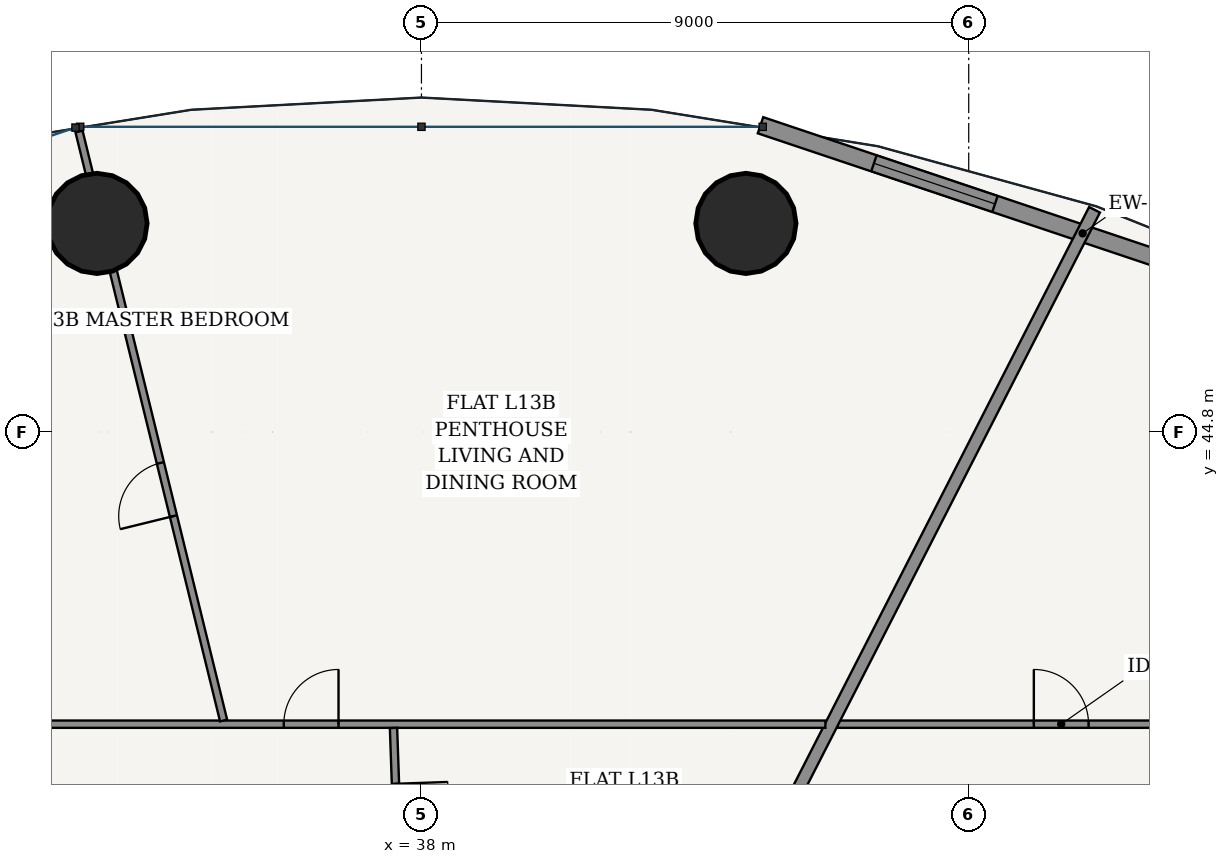
"""IFC4 building model, lengths in metres.
Left out: names, types, materials, properties, quantities, classifications, styles, units other than length and angle.
Written with IfcOpenShell. Run it as: python <this file> out.ifc"""

import sys

from ifc_helpers import new_model, si_unit, direction, frame, frame_2d, origin, origin_2d, place, context, subcontext, project, spatial, rectangle, hollow_circle, extrude, source, transform, mapped, element, fill, save


model = new_model("IFC4")
c1 = context("Model", 3, precision=1e-05, world=origin(), true_north=direction((-0.2419218956, 0.970295726276)))
c2 = subcontext(c1, "Body", "Model", "MODEL_VIEW")
j1 = project(units=[si_unit("LENGTHUNIT", "METRE"), si_unit("PLANEANGLEUNIT", "RADIAN")], contexts=[c1])
p1 = place(None, origin())
s1 = spatial("IfcSite", under=j1, at=p1, CompositionType="ELEMENT")
p2 = place(p1, origin())
s2 = spatial("IfcBuilding", under=s1, at=p2, CompositionType="ELEMENT")
p3 = place(p2, frame((0.0, 0.0, 52.8)))
s3 = spatial("IfcBuildingStorey", under=s2, at=p3, CompositionType="ELEMENT", Elevation=52.8)
for number, where, z_axis, x_axis in (
    (1, (43.336, 48.23, 0.0), (0.0, 0.0, 1.0), (1.0, 0.0, 0.0)),
    (2, (32.664, 48.23, 0.0), (0.0, 0.0, 1.0), (1.0, 0.0, 0.0)),
):
    element("IfcColumn", number, at=place(p3, frame(where, z_axis=z_axis, x_axis=x_axis)), inside=s3, PredefinedType="COLUMN", context=c2, shape_type="SweptSolid", body=[
        extrude(hollow_circle(Radius=0.825, WallThickness=0.05, at=origin_2d()), origin(), (0.0, 0.0, 1.0), 3.6),
    ])
p4 = place(p3, frame((54.171, 46.289, 0.0), z_axis=(0.0, 0.0, 1.0), x_axis=(-0.948041258496, 0.318147406385, 0.0)))
e3 = element("IfcWall", 3, at=p4, inside=s3, PredefinedType="SOLIDWALL", context=c2, shape_type="SweptSolid", body=[
    extrude(rectangle(XDim=11.175, YDim=0.28, at=frame_2d((5.588, 0.0))), origin(), (0.0, 0.0, 1.0), 3.32),
])
p5 = place(p4, frame((1.967, 0.0, 0.85)))
e4 = element("IfcOpeningElement", 4, at=p5, cuts=e3, PredefinedType="OPENING", context=c2, shape_type="SweptSolid", body=[
    extrude(rectangle(XDim=2.1, YDim=1.95, at=frame_2d((1.05, 0.975))), frame((0.0, 0.15, 0.0), z_axis=(0.0, -1.0, 0.0), x_axis=(1.0, 0.0, 0.0)), (0.0, 0.0, 1.0), 0.3),
])
p6 = place(p4, frame((7.108, 0.0, 0.85)))
e5 = element("IfcOpeningElement", 5, at=p6, cuts=e3, PredefinedType="OPENING", context=c2, shape_type="SweptSolid", body=[
    extrude(rectangle(XDim=2.1, YDim=1.95, at=frame_2d((1.05, 0.975))), frame((0.0, 0.15, 0.0), z_axis=(0.0, -1.0, 0.0), x_axis=(1.0, 0.0, 0.0)), (0.0, 0.0, 1.0), 0.3),
])
p7 = place(p3, frame((44.847, 39.995, 0.0), z_axis=(0.0, 0.0, 1.0), x_axis=(1.0, 0.0, 0.0)))
e6 = element("IfcWall", 6, at=p7, inside=s3, PredefinedType="PARTITIONING", context=c2, shape_type="SweptSolid", body=[
    extrude(rectangle(XDim=7.348, YDim=0.12, at=frame_2d((3.674, 0.0))), origin(), (0.0, 0.0, 1.0), 2.688),
])
p8 = place(p7, frame((3.224, 0.0, 0.0)))
e7 = element("IfcOpeningElement", 7, at=p8, cuts=e6, PredefinedType="OPENING", context=c2, shape_type="SweptSolid", body=[
    extrude(rectangle(XDim=0.9, YDim=2.15, at=frame_2d((0.45, 1.075))), frame((0.0, 0.07, 0.0), z_axis=(0.0, -1.0, 0.0), x_axis=(1.0, 0.0, 0.0)), (0.0, 0.0, 1.0), 0.14),
])
p9 = place(p3, frame((43.335, 37.237, 0.0), z_axis=(0.0, 0.0, 1.0), x_axis=(0.455148959499, 0.890415310216, 0.0)))
e8 = element("IfcWall", 8, at=p9, inside=s3, PredefinedType="PARTITIONING", context=c2, shape_type="SweptSolid", body=[
    extrude(rectangle(XDim=12.598, YDim=0.2, at=frame_2d((6.299, 0.0))), origin(), (0.0, 0.0, 1.0), 2.762),
])
p10 = place(p3, frame((23.805, 39.995, 0.0), z_axis=(0.0, 0.0, 1.0), x_axis=(1.0, 0.0, 0.0)))
e9 = element("IfcWall", 9, at=p10, inside=s3, PredefinedType="PARTITIONING", context=c2, shape_type="SweptSolid", body=[
    extrude(rectangle(XDim=20.838, YDim=0.12, at=frame_2d((10.419, 0.0))), origin(), (0.0, 0.0, 1.0), 2.688),
])
p11 = place(p10, frame((11.931, 0.0, 0.0)))
e10 = element("IfcOpeningElement", 10, at=p11, cuts=e9, PredefinedType="OPENING", context=c2, shape_type="SweptSolid", body=[
    extrude(rectangle(XDim=0.9, YDim=2.15, at=frame_2d((0.45, 1.075))), frame((0.0, 0.07, 0.0), z_axis=(0.0, -1.0, 0.0), x_axis=(1.0, 0.0, 0.0)), (0.0, 0.0, 1.0), 0.14),
])
p12 = place(p3, frame((34.746, 40.055, 0.0), z_axis=(0.0, 0.0, 1.0), x_axis=(-0.238386209483, 0.971170435675, 0.0)))
e11 = element("IfcWall", 11, at=p12, inside=s3, PredefinedType="PARTITIONING", context=c2, shape_type="SweptSolid", body=[
    extrude(rectangle(XDim=9.973, YDim=0.12, at=frame_2d((4.987, 0.0))), origin(), (0.0, 0.0, 1.0), 2.688),
])
p13 = place(p12, frame((3.461, 0.0, 0.0)))
e12 = element("IfcOpeningElement", 12, at=p13, cuts=e11, PredefinedType="OPENING", context=c2, shape_type="SweptSolid", body=[
    extrude(rectangle(XDim=0.9, YDim=2.15, at=frame_2d((0.45, 1.075))), frame((0.0, 0.07, 0.0), z_axis=(0.0, -1.0, 0.0), x_axis=(1.0, 0.0, 0.0)), (0.0, 0.0, 1.0), 0.14),
])
p14 = place(p3, frame((37.635, 37.237, 0.0), z_axis=(0.0, 0.0, 1.0), x_axis=(-0.03493293564, 0.999389658746, 0.0)))
e13 = element("IfcWall", 13, at=p14, inside=s3, PredefinedType="PARTITIONING", context=c2, shape_type="SweptSolid", body=[
    extrude(rectangle(XDim=2.698, YDim=0.12, at=frame_2d((1.349, 0.0))), origin(), (0.0, 0.0, 1.0), 3.32),
])
p15 = place(p14, frame((0.919, 0.0, 0.0)))
e14 = element("IfcOpeningElement", 14, at=p15, cuts=e13, PredefinedType="OPENING", context=c2, shape_type="SweptSolid", body=[
    extrude(rectangle(XDim=0.86, YDim=2.15, at=frame_2d((0.43, 1.075))), frame((0.0, 0.07, 0.0), z_axis=(0.0, -1.0, 0.0), x_axis=(1.0, 0.0, 0.0)), (0.0, 0.0, 1.0), 0.14),
])
m1 = source(origin(), c2, "Body", "SweptSolid", [
    extrude(rectangle(XDim=2.1, YDim=1.95, at=frame_2d((1.05, 0.975))), frame((0.0, 0.03, 0.0), z_axis=(0.0, -1.0, 0.0), x_axis=(1.0, 0.0, 0.0)), (0.0, 0.0, 1.0), 0.06),
])
p16 = place(p6, origin())
e15 = element("IfcWindow", 15, at=p16, inside=s3, PartitioningType="SINGLE_PANEL", PredefinedType="WINDOW", context=c2, shape_type="MappedRepresentation", body=[
    mapped(m1, transform((0.0, 0.0, 0.0), scale=1.0)),
])
fill(e5, e15)
m2 = source(origin(), c2, "Body", "SweptSolid", [
    extrude(rectangle(XDim=0.9, YDim=2.15, at=frame_2d((0.45, 1.075))), frame((0.0, 0.025, 0.0), z_axis=(0.0, -1.0, 0.0), x_axis=(1.0, 0.0, 0.0)), (0.0, 0.0, 1.0), 0.05),
])
p17 = place(p8, origin())
e16 = element("IfcDoor", 16, at=p17, inside=s3, OperationType="SINGLE_SWING_LEFT", PredefinedType="DOOR", context=c2, shape_type="MappedRepresentation", body=[
    mapped(m2, transform((0.0, 0.0, 0.0), scale=1.0)),
])
fill(e7, e16)
m3 = source(origin(), c2, "Body", "SweptSolid", [
    extrude(rectangle(XDim=0.86, YDim=2.15, at=frame_2d((0.43, 1.075))), frame((0.0, 0.025, 0.0), z_axis=(0.0, -1.0, 0.0), x_axis=(1.0, 0.0, 0.0)), (0.0, 0.0, 1.0), 0.05),
])
p18 = place(p15, frame((0.86, 0.0, 0.0), z_axis=(0.0, 0.0, 1.0), x_axis=(-1.0, 0.0, 0.0)))
e17 = element("IfcDoor", 17, at=p18, inside=s3, OperationType="SINGLE_SWING_LEFT", PredefinedType="DOOR", context=c2, shape_type="MappedRepresentation", body=[
    mapped(m3, transform((0.0, 0.0, 0.0), scale=1.0)),
])
fill(e14, e17)
p19 = place(p11, origin())
e18 = element("IfcDoor", 18, at=p19, inside=s3, OperationType="SINGLE_SWING_RIGHT", PredefinedType="DOOR", context=c2, shape_type="MappedRepresentation", body=[
    mapped(m2, transform((0.0, 0.0, 0.0), scale=1.0)),
])
fill(e10, e18)
p20 = place(p13, origin())
e19 = element("IfcDoor", 19, at=p20, inside=s3, OperationType="SINGLE_SWING_LEFT", PredefinedType="DOOR", context=c2, shape_type="MappedRepresentation", body=[
    mapped(m2, transform((0.0, 0.0, 0.0), scale=1.0)),
])
fill(e12, e19)
save(model, sys.argv[1])
